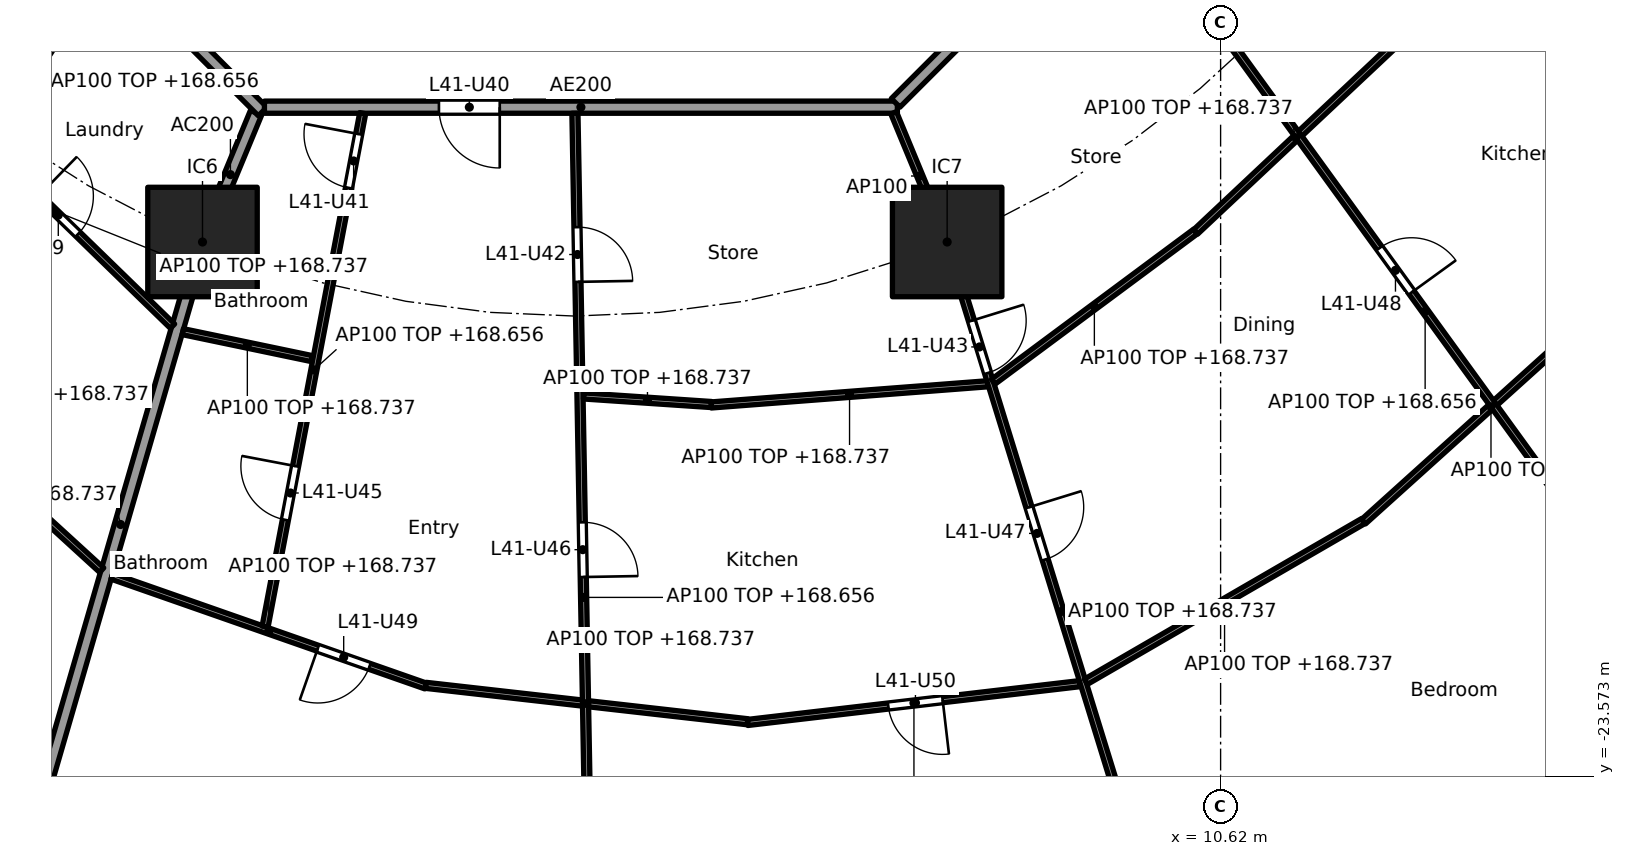
"""IFC4 building model, lengths in metres.
Left out: names, types, materials, properties, quantities, classifications, styles, units other than length and angle.
Written with IfcOpenShell. Run it as: python <this file> out.ifc"""

import sys

from ifc_helpers import new_model, si_unit, direction, frame, frame_2d, origin, origin_2d, place, context, subcontext, project, spatial, rectangle, extrude, element, fill, save


model = new_model("IFC4")
c1 = context("Model", 3, precision=1e-05, world=origin(), true_north=direction((0.0, 1.0)))
c2 = subcontext(c1, "Body", "Model", "MODEL_VIEW")
j1 = project(units=[si_unit("LENGTHUNIT", "METRE"), si_unit("PLANEANGLEUNIT", "RADIAN")], contexts=[c1])
p1 = place(None, origin())
s1 = spatial("IfcSite", under=j1, at=p1, CompositionType="ELEMENT")
p2 = place(p1, origin())
s2 = spatial("IfcBuilding", under=s1, at=p2, CompositionType="ELEMENT")
p3 = place(p2, frame((0.0, 0.0, 165.9)))
s3 = spatial("IfcBuildingStorey", under=s2, at=p3, CompositionType="ELEMENT", Elevation=165.9)
for number, where, z_axis, x_axis in (
    (1, (-6.123, -14.782, 0.0), (0.0, 0.0, 1.0), (1.0, 0.0, 0.0)),
    (2, (6.123, -14.782, 0.0), (0.0, 0.0, 1.0), (1.0, 0.0, 0.0)),
):
    element("IfcColumn", number, at=place(p3, frame(where, z_axis=z_axis, x_axis=x_axis)), inside=s3, PredefinedType="COLUMN", context=c2, shape_type="SweptSolid", body=[
        extrude(rectangle(XDim=1.8, YDim=1.8, at=origin_2d()), origin(), (0.0, 0.0, 1.0), 3.7),
    ])
p4 = place(p3, frame((-12.553, -23.989, 0.0), z_axis=(0.0, 0.0, 1.0), x_axis=(0.835812595664, -0.549014849462, 0.0)))
e3 = element("IfcWall", 3, at=p4, inside=s3, PredefinedType="SOLIDWALL", context=c2, shape_type="SweptSolid", body=[
    extrude(rectangle(XDim=6.903, YDim=1.6, at=frame_2d((3.451, 0.0))), origin(), (0.0, 0.0, 1.0), 1.1),
])
p5 = place(p3, frame((-5.243, -12.657, 0.0), z_axis=(0.0, 0.0, 1.0), x_axis=(-0.382707856524, -0.923869415315, 0.0)))
e4 = element("IfcWall", 4, at=p5, inside=s3, PredefinedType="PARTITIONING", context=c2, shape_type="SweptSolid", body=[
    extrude(rectangle(XDim=2.2, YDim=0.2, at=frame_2d((1.1, 0.0))), origin(), (0.0, 0.0, 1.0), 3.44),
])
p6 = place(p3, frame((-6.137, -14.83, 0.0), z_axis=(0.0, 0.0, 1.0), x_axis=(-0.278461169897, -0.96044748782, 0.0)))
e5 = element("IfcWall", 5, at=p6, inside=s3, PredefinedType="PARTITIONING", context=c2, shape_type="SweptSolid", body=[
    extrude(rectangle(XDim=9.573, YDim=0.2, at=frame_2d((4.787, 0.0))), origin(), (0.0, 0.0, 1.0), 2.837),
])
p7 = place(p3, frame((14.822, -6.154, 0.0), z_axis=(0.0, 0.0, 1.0), x_axis=(0.792203056092, -0.610257583254, 0.0)))
e6 = element("IfcWall", 6, at=p7, inside=s3, PredefinedType="PARTITIONING", context=c2, shape_type="SweptSolid", body=[
    extrude(rectangle(XDim=12.533, YDim=0.2, at=frame_2d((6.266, 0.0))), origin(), (0.0, 0.0, 1.0), 2.837),
])
p8 = place(p3, frame((-12.635, -5.134, 0.0), z_axis=(0.0, 0.0, 1.0), x_axis=(0.707106781187, -0.707106781187, 0.0)))
e7 = element("IfcWall", 7, at=p8, inside=s3, PredefinedType="PARTITIONING", context=c2, shape_type="SweptSolid", body=[
    extrude(rectangle(XDim=10.609, YDim=0.2, at=frame_2d((5.305, 0.0))), origin(), (0.0, 0.0, 1.0), 3.44),
])
p9 = place(p3, frame((-5.104, -12.565, 0.0), z_axis=(0.0, 0.0, 1.0), x_axis=(1.0, 0.0, 0.0)))
e8 = element("IfcWall", 8, at=p9, inside=s3, PredefinedType="PARTITIONING", context=c2, shape_type="SweptSolid", body=[
    extrude(rectangle(XDim=10.409, YDim=0.2, at=frame_2d((5.205, 0.0))), origin(), (0.0, 0.0, 1.0), 3.44),
])
p10 = place(p9, frame((2.87, 0.0, 0.0)))
e9 = element("IfcOpeningElement", 9, at=p10, cuts=e8, PredefinedType="OPENING", context=c2, shape_type="SweptSolid", body=[
    extrude(rectangle(XDim=1.0, YDim=2.1, at=frame_2d((0.5, 1.05))), frame((0.0, 0.11, 0.0), z_axis=(0.0, -1.0, 0.0), x_axis=(1.0, 0.0, 0.0)), (0.0, 0.0, 1.0), 0.22),
])
p11 = place(p3, frame((5.275, -12.494, 0.0), z_axis=(0.0, 0.0, 1.0), x_axis=(0.707106781187, 0.707106781187, 0.0)))
e10 = element("IfcWall", 10, at=p11, inside=s3, PredefinedType="PARTITIONING", context=c2, shape_type="SweptSolid", body=[
    extrude(rectangle(XDim=10.409, YDim=0.2, at=frame_2d((5.205, 0.0))), origin(), (0.0, 0.0, 1.0), 3.44),
])
p12 = place(p3, frame((-7.712, -10.195, 0.0), z_axis=(0.0, 0.0, 1.0), x_axis=(-0.544170086001, -0.838974920663, 0.0)))
e11 = element("IfcWall", 11, at=p12, inside=s3, PredefinedType="PARTITIONING", context=c2, shape_type="SweptSolid", body=[
    extrude(rectangle(XDim=3.535, YDim=0.1, at=frame_2d((1.768, 0.0))), origin(), (0.0, 0.0, 1.0), 2.756),
])
p13 = place(p3, frame((-9.627, -13.238, 0.0), z_axis=(0.0, 0.0, 1.0), x_axis=(0.716919058692, -0.697156412352, 0.0)))
e12 = element("IfcWall", 12, at=p13, inside=s3, PredefinedType="PARTITIONING", context=c2, shape_type="SweptSolid", body=[
    extrude(rectangle(XDim=4.2, YDim=0.1, at=frame_2d((2.1, 0.0))), origin(), (0.0, 0.0, 1.0), 2.837),
])
p14 = place(p13, frame((1.13, 0.0, 0.0)))
e13 = element("IfcOpeningElement", 13, at=p14, cuts=e12, PredefinedType="OPENING", context=c2, shape_type="SweptSolid", body=[
    extrude(rectangle(XDim=0.9, YDim=2.1, at=frame_2d((0.45, 1.05))), frame((0.0, 0.06, 0.0), z_axis=(0.0, -1.0, 0.0), x_axis=(1.0, 0.0, 0.0)), (0.0, 0.0, 1.0), 0.12),
])
p15 = place(p3, frame((-11.766, -16.535, 0.0), z_axis=(0.0, 0.0, 1.0), x_axis=(0.73807320557, -0.674720640872, 0.0)))
e14 = element("IfcWall", 14, at=p15, inside=s3, PredefinedType="PARTITIONING", context=c2, shape_type="SweptSolid", body=[
    extrude(rectangle(XDim=5.399, YDim=0.1, at=frame_2d((2.699, 0.0))), origin(), (0.0, 0.0, 1.0), 2.837),
])
p16 = place(p3, frame((-6.447, -16.256, 0.0), z_axis=(0.0, 0.0, 1.0), x_axis=(0.978909151576, -0.204296042448, 0.0)))
e15 = element("IfcWall", 15, at=p16, inside=s3, PredefinedType="PARTITIONING", context=c2, shape_type="SweptSolid", body=[
    extrude(rectangle(XDim=2.168, YDim=0.1, at=frame_2d((1.084, 0.0))), origin(), (0.0, 0.0, 1.0), 2.837),
])
p17 = place(p3, frame((-7.613, -20.278, 0.0), z_axis=(0.0, 0.0, 1.0), x_axis=(0.943918212431, -0.330179357684, 0.0)))
e16 = element("IfcWall", 16, at=p17, inside=s3, PredefinedType="PARTITIONING", context=c2, shape_type="SweptSolid", body=[
    extrude(rectangle(XDim=5.467, YDim=0.1, at=frame_2d((2.734, 0.0))), origin(), (0.0, 0.0, 1.0), 2.837),
])
p18 = place(p17, frame((3.588, 0.0, 0.0)))
e17 = element("IfcOpeningElement", 17, at=p18, cuts=e16, PredefinedType="OPENING", context=c2, shape_type="SweptSolid", body=[
    extrude(rectangle(XDim=0.9, YDim=2.1, at=frame_2d((0.45, 1.05))), frame((0.0, 0.06, 0.0), z_axis=(0.0, -1.0, 0.0), x_axis=(1.0, 0.0, 0.0)), (0.0, 0.0, 1.0), 0.12),
])
p19 = place(p3, frame((-3.488, -12.663, 0.0), z_axis=(0.0, 0.0, 1.0), x_axis=(-0.186783185485, -0.982401161247, 0.0)))
e18 = element("IfcWall", 18, at=p19, inside=s3, PredefinedType="PARTITIONING", context=c2, shape_type="SweptSolid", body=[
    extrude(rectangle(XDim=8.595, YDim=0.1, at=frame_2d((4.298, 0.0))), origin(), (0.0, 0.0, 1.0), 2.756),
])
p20 = place(p19, frame((0.35, 0.0, 0.0)))
e19 = element("IfcOpeningElement", 19, at=p20, cuts=e18, PredefinedType="OPENING", context=c2, shape_type="SweptSolid", body=[
    extrude(rectangle(XDim=0.9, YDim=2.1, at=frame_2d((0.45, 1.05))), frame((0.0, 0.06, 0.0), z_axis=(0.0, -1.0, 0.0), x_axis=(1.0, 0.0, 0.0)), (0.0, 0.0, 1.0), 0.12),
])
p21 = place(p19, frame((5.908, 0.0, 0.0)))
e20 = element("IfcOpeningElement", 20, at=p21, cuts=e18, PredefinedType="OPENING", context=c2, shape_type="SweptSolid", body=[
    extrude(rectangle(XDim=0.9, YDim=2.1, at=frame_2d((0.45, 1.05))), frame((0.0, 0.06, 0.0), z_axis=(0.0, -1.0, 0.0), x_axis=(1.0, 0.0, 0.0)), (0.0, 0.0, 1.0), 0.12),
])
p22 = place(p3, frame((-2.449, -22.073, 0.0), z_axis=(0.0, 0.0, 1.0), x_axis=(0.993660315081, -0.112424099879, 0.0)))
e21 = element("IfcWall", 21, at=p22, inside=s3, PredefinedType="PARTITIONING", context=c2, shape_type="SweptSolid", body=[
    extrude(rectangle(XDim=5.325, YDim=0.1, at=frame_2d((2.662, 0.0))), origin(), (0.0, 0.0, 1.0), 2.837),
])
p23 = place(p3, frame((0.002, -12.665, 0.0), z_axis=(0.0, 0.0, 1.0), x_axis=(0.01792079652, -0.999839409631, 0.0)))
e22 = element("IfcWall", 22, at=p23, inside=s3, PredefinedType="PARTITIONING", context=c2, shape_type="SweptSolid", body=[
    extrude(rectangle(XDim=15.926, YDim=0.1, at=frame_2d((7.963, 0.0))), origin(), (0.0, 0.0, 1.0), 2.756),
])
p24 = place(p23, frame((1.873, 0.0, 0.0)))
e23 = element("IfcOpeningElement", 23, at=p24, cuts=e22, PredefinedType="OPENING", context=c2, shape_type="SweptSolid", body=[
    extrude(rectangle(XDim=0.9, YDim=2.1, at=frame_2d((0.45, 1.05))), frame((0.0, 0.06, 0.0), z_axis=(0.0, -1.0, 0.0), x_axis=(1.0, 0.0, 0.0)), (0.0, 0.0, 1.0), 0.12),
])
p25 = place(p23, frame((6.728, 0.0, 0.0)))
e24 = element("IfcOpeningElement", 24, at=p25, cuts=e22, PredefinedType="OPENING", context=c2, shape_type="SweptSolid", body=[
    extrude(rectangle(XDim=0.9, YDim=2.1, at=frame_2d((0.45, 1.05))), frame((0.0, 0.06, 0.0), z_axis=(0.0, -1.0, 0.0), x_axis=(1.0, 0.0, 0.0)), (0.0, 0.0, 1.0), 0.12),
])
p26 = place(p3, frame((0.145, -17.314, 0.0), z_axis=(0.0, 0.0, 1.0), x_axis=(0.997756833447, -0.06694252243, 0.0)))
e25 = element("IfcWall", 25, at=p26, inside=s3, PredefinedType="PARTITIONING", context=c2, shape_type="SweptSolid", body=[
    extrude(rectangle(XDim=2.104, YDim=0.1, at=frame_2d((1.052, 0.0))), origin(), (0.0, 0.0, 1.0), 2.837),
])
p27 = place(p3, frame((2.245, -17.462, 0.0), z_axis=(0.0, 0.0, 1.0), x_axis=(0.997077117727, 0.07640171009, 0.0)))
e26 = element("IfcWall", 26, at=p27, inside=s3, PredefinedType="PARTITIONING", context=c2, shape_type="SweptSolid", body=[
    extrude(rectangle(XDim=4.56, YDim=0.1, at=frame_2d((2.28, 0.0))), origin(), (0.0, 0.0, 1.0), 2.837),
])
p28 = place(p3, frame((2.842, -22.683, 0.0), z_axis=(0.0, 0.0, 1.0), x_axis=(0.993248590259, 0.116005335864, 0.0)))
e27 = element("IfcWall", 27, at=p28, inside=s3, PredefinedType="PARTITIONING", context=c2, shape_type="SweptSolid", body=[
    extrude(rectangle(XDim=5.508, YDim=0.1, at=frame_2d((2.754, 0.0))), origin(), (0.0, 0.0, 1.0), 2.837),
])
p29 = place(p28, frame((2.329, 0.0, 0.0)))
e28 = element("IfcOpeningElement", 28, at=p29, cuts=e27, PredefinedType="OPENING", context=c2, shape_type="SweptSolid", body=[
    extrude(rectangle(XDim=0.9, YDim=2.1, at=frame_2d((0.45, 1.05))), frame((0.0, 0.06, 0.0), z_axis=(0.0, -1.0, 0.0), x_axis=(1.0, 0.0, 0.0)), (0.0, 0.0, 1.0), 0.12),
])
p30 = place(p3, frame((5.243, -12.657, 0.0), z_axis=(0.0, 0.0, 1.0), x_axis=(0.382719158442, -0.923864733477, 0.0)))
e29 = element("IfcWall", 29, at=p30, inside=s3, PredefinedType="PARTITIONING", context=c2, shape_type="SweptSolid", body=[
    extrude(rectangle(XDim=2.25, YDim=0.1, at=frame_2d((1.125, 0.0))), origin(), (0.0, 0.0, 1.0), 3.44),
])
p31 = place(p3, frame((6.138, -14.83, 0.0), z_axis=(0.0, 0.0, 1.0), x_axis=(0.294818517221, -0.955553264818, 0.0)))
e30 = element("IfcWall", 30, at=p31, inside=s3, PredefinedType="PARTITIONING", context=c2, shape_type="SweptSolid", body=[
    extrude(rectangle(XDim=12.619, YDim=0.1, at=frame_2d((6.31, 0.0))), origin(), (0.0, 0.0, 1.0), 2.837),
])
p32 = place(p31, frame((1.306, 0.0, 0.0)))
e31 = element("IfcOpeningElement", 31, at=p32, cuts=e30, PredefinedType="OPENING", context=c2, shape_type="SweptSolid", body=[
    extrude(rectangle(XDim=0.9, YDim=2.1, at=frame_2d((0.45, 1.05))), frame((0.0, 0.06, 0.0), z_axis=(0.0, -1.0, 0.0), x_axis=(1.0, 0.0, 0.0)), (0.0, 0.0, 1.0), 0.12),
])
p33 = place(p31, frame((4.515, 0.0, 0.0)))
e32 = element("IfcOpeningElement", 32, at=p33, cuts=e30, PredefinedType="OPENING", context=c2, shape_type="SweptSolid", body=[
    extrude(rectangle(XDim=0.9, YDim=2.1, at=frame_2d((0.45, 1.05))), frame((0.0, 0.06, 0.0), z_axis=(0.0, -1.0, 0.0), x_axis=(1.0, 0.0, 0.0)), (0.0, 0.0, 1.0), 0.12),
])
p34 = place(p31, frame((9.632, 0.0, 0.0)))
e33 = element("IfcOpeningElement", 33, at=p34, cuts=e30, PredefinedType="OPENING", context=c2, shape_type="SweptSolid", body=[
    extrude(rectangle(XDim=0.9, YDim=2.1, at=frame_2d((0.45, 1.05))), frame((0.0, 0.06, 0.0), z_axis=(0.0, -1.0, 0.0), x_axis=(1.0, 0.0, 0.0)), (0.0, 0.0, 1.0), 0.12),
])
p35 = place(p3, frame((6.881, -17.08, 0.0), z_axis=(0.0, 0.0, 1.0), x_axis=(0.802784956441, 0.596268659005, 0.0)))
e34 = element("IfcWall", 34, at=p35, inside=s3, PredefinedType="PARTITIONING", context=c2, shape_type="SweptSolid", body=[
    extrude(rectangle(XDim=4.142, YDim=0.1, at=frame_2d((2.071, 0.0))), origin(), (0.0, 0.0, 1.0), 2.837),
])
p36 = place(p3, frame((8.405, -22.013, 0.0), z_axis=(0.0, 0.0, 1.0), x_axis=(0.865277177388, 0.501293732547, 0.0)))
e35 = element("IfcWall", 35, at=p36, inside=s3, PredefinedType="PARTITIONING", context=c2, shape_type="SweptSolid", body=[
    extrude(rectangle(XDim=5.27, YDim=0.1, at=frame_2d((2.635, 0.0))), origin(), (0.0, 0.0, 1.0), 2.837),
])
p37 = place(p3, frame((10.21, -14.614, 0.0), z_axis=(0.0, 0.0, 1.0), x_axis=(0.728883199496, 0.684638066055, 0.0)))
e36 = element("IfcWall", 36, at=p37, inside=s3, PredefinedType="PARTITIONING", context=c2, shape_type="SweptSolid", body=[
    extrude(rectangle(XDim=4.519, YDim=0.1, at=frame_2d((2.26, 0.0))), origin(), (0.0, 0.0, 1.0), 2.837),
])
p38 = place(p3, frame((12.971, -19.38, 0.0), z_axis=(0.0, 0.0, 1.0), x_axis=(0.742768881471, 0.669547898748, 0.0)))
e37 = element("IfcWall", 37, at=p38, inside=s3, PredefinedType="PARTITIONING", context=c2, shape_type="SweptSolid", body=[
    extrude(rectangle(XDim=5.642, YDim=0.1, at=frame_2d((2.821, 0.0))), origin(), (0.0, 0.0, 1.0), 2.837),
])
p39 = place(p3, frame((8.943, -8.966, 0.0), z_axis=(0.0, 0.0, 1.0), x_axis=(0.586803608919, -0.809729290912, 0.0)))
e38 = element("IfcWall", 38, at=p39, inside=s3, PredefinedType="PARTITIONING", context=c2, shape_type="SweptSolid", body=[
    extrude(rectangle(XDim=17.179, YDim=0.1, at=frame_2d((8.589, 0.0))), origin(), (0.0, 0.0, 1.0), 2.756),
])
p40 = place(p39, frame((2.062, 0.0, 0.0)))
e39 = element("IfcOpeningElement", 39, at=p40, cuts=e38, PredefinedType="OPENING", context=c2, shape_type="SweptSolid", body=[
    extrude(rectangle(XDim=0.9, YDim=2.1, at=frame_2d((0.45, 1.05))), frame((0.0, 0.06, 0.0), z_axis=(0.0, -1.0, 0.0), x_axis=(1.0, 0.0, 0.0)), (0.0, 0.0, 1.0), 0.12),
])
p41 = place(p39, frame((7.308, 0.0, 0.0)))
e40 = element("IfcOpeningElement", 40, at=p41, cuts=e38, PredefinedType="OPENING", context=c2, shape_type="SweptSolid", body=[
    extrude(rectangle(XDim=0.9, YDim=2.1, at=frame_2d((0.45, 1.05))), frame((0.0, 0.06, 0.0), z_axis=(0.0, -1.0, 0.0), x_axis=(1.0, 0.0, 0.0)), (0.0, 0.0, 1.0), 0.12),
])
p42 = place(p14, origin())
e41 = element("IfcDoor", 41, at=p42, inside=s3, OperationType="SINGLE_SWING_LEFT", PredefinedType="DOOR", context=c2, shape_type="SweptSolid", body=[
    extrude(rectangle(XDim=0.9, YDim=2.1, at=frame_2d((0.45, 1.05))), frame((0.0, 0.025, 0.0), z_axis=(0.0, -1.0, 0.0), x_axis=(1.0, 0.0, 0.0)), (0.0, 0.0, 1.0), 0.05),
])
fill(e13, e41)
p43 = place(p10, frame((1.0, 0.0, 0.0), x_axis=(-1.0, 0.0, 0.0)))
e42 = element("IfcDoor", 42, at=p43, inside=s3, OperationType="SINGLE_SWING_LEFT", PredefinedType="DOOR", context=c2, shape_type="SweptSolid", body=[
    extrude(rectangle(XDim=1.0, YDim=2.1, at=frame_2d((0.5, 1.05))), frame((0.0, 0.025, 0.0), z_axis=(0.0, -1.0, 0.0), x_axis=(1.0, 0.0, 0.0)), (0.0, 0.0, 1.0), 0.05),
])
fill(e9, e42)
p44 = place(p20, frame((0.9, 0.0, 0.0), x_axis=(-1.0, 0.0, 0.0)))
e43 = element("IfcDoor", 43, at=p44, inside=s3, OperationType="SINGLE_SWING_RIGHT", PredefinedType="DOOR", context=c2, shape_type="SweptSolid", body=[
    extrude(rectangle(XDim=0.9, YDim=2.1, at=frame_2d((0.45, 1.05))), frame((0.0, 0.025, 0.0), z_axis=(0.0, -1.0, 0.0), x_axis=(1.0, 0.0, 0.0)), (0.0, 0.0, 1.0), 0.05),
])
fill(e19, e43)
p45 = place(p24, origin())
e44 = element("IfcDoor", 44, at=p45, inside=s3, OperationType="SINGLE_SWING_RIGHT", PredefinedType="DOOR", context=c2, shape_type="SweptSolid", body=[
    extrude(rectangle(XDim=0.9, YDim=2.1, at=frame_2d((0.45, 1.05))), frame((0.0, 0.025, 0.0), z_axis=(0.0, -1.0, 0.0), x_axis=(1.0, 0.0, 0.0)), (0.0, 0.0, 1.0), 0.05),
])
fill(e23, e44)
p46 = place(p32, origin())
e45 = element("IfcDoor", 45, at=p46, inside=s3, OperationType="SINGLE_SWING_LEFT", PredefinedType="DOOR", context=c2, shape_type="SweptSolid", body=[
    extrude(rectangle(XDim=0.9, YDim=2.1, at=frame_2d((0.45, 1.05))), frame((0.0, 0.025, 0.0), z_axis=(0.0, -1.0, 0.0), x_axis=(1.0, 0.0, 0.0)), (0.0, 0.0, 1.0), 0.05),
])
fill(e31, e45)
p47 = place(p21, frame((0.9, 0.0, 0.0), x_axis=(-1.0, 0.0, 0.0)))
e46 = element("IfcDoor", 46, at=p47, inside=s3, OperationType="SINGLE_SWING_RIGHT", PredefinedType="DOOR", context=c2, shape_type="SweptSolid", body=[
    extrude(rectangle(XDim=0.9, YDim=2.1, at=frame_2d((0.45, 1.05))), frame((0.0, 0.025, 0.0), z_axis=(0.0, -1.0, 0.0), x_axis=(1.0, 0.0, 0.0)), (0.0, 0.0, 1.0), 0.05),
])
fill(e20, e46)
p48 = place(p25, origin())
e47 = element("IfcDoor", 47, at=p48, inside=s3, OperationType="SINGLE_SWING_RIGHT", PredefinedType="DOOR", context=c2, shape_type="SweptSolid", body=[
    extrude(rectangle(XDim=0.9, YDim=2.1, at=frame_2d((0.45, 1.05))), frame((0.0, 0.025, 0.0), z_axis=(0.0, -1.0, 0.0), x_axis=(1.0, 0.0, 0.0)), (0.0, 0.0, 1.0), 0.05),
])
fill(e24, e47)
p49 = place(p33, origin())
e48 = element("IfcDoor", 48, at=p49, inside=s3, OperationType="SINGLE_SWING_LEFT", PredefinedType="DOOR", context=c2, shape_type="SweptSolid", body=[
    extrude(rectangle(XDim=0.9, YDim=2.1, at=frame_2d((0.45, 1.05))), frame((0.0, 0.025, 0.0), z_axis=(0.0, -1.0, 0.0), x_axis=(1.0, 0.0, 0.0)), (0.0, 0.0, 1.0), 0.05),
])
fill(e32, e48)
p50 = place(p41, origin())
e49 = element("IfcDoor", 49, at=p50, inside=s3, OperationType="SINGLE_SWING_RIGHT", PredefinedType="DOOR", context=c2, shape_type="SweptSolid", body=[
    extrude(rectangle(XDim=0.9, YDim=2.1, at=frame_2d((0.45, 1.05))), frame((0.0, 0.025, 0.0), z_axis=(0.0, -1.0, 0.0), x_axis=(1.0, 0.0, 0.0)), (0.0, 0.0, 1.0), 0.05),
])
fill(e40, e49)
p51 = place(p18, frame((0.9, 0.0, 0.0), x_axis=(-1.0, 0.0, 0.0)))
e50 = element("IfcDoor", 50, at=p51, inside=s3, OperationType="SINGLE_SWING_RIGHT", PredefinedType="DOOR", context=c2, shape_type="SweptSolid", body=[
    extrude(rectangle(XDim=0.9, YDim=2.1, at=frame_2d((0.45, 1.05))), frame((0.0, 0.025, 0.0), z_axis=(0.0, -1.0, 0.0), x_axis=(1.0, 0.0, 0.0)), (0.0, 0.0, 1.0), 0.05),
])
fill(e17, e50)
p52 = place(p29, frame((0.9, 0.0, 0.0), x_axis=(-1.0, 0.0, 0.0)))
e51 = element("IfcDoor", 51, at=p52, inside=s3, OperationType="SINGLE_SWING_LEFT", PredefinedType="DOOR", context=c2, shape_type="SweptSolid", body=[
    extrude(rectangle(XDim=0.9, YDim=2.1, at=frame_2d((0.45, 1.05))), frame((0.0, 0.025, 0.0), z_axis=(0.0, -1.0, 0.0), x_axis=(1.0, 0.0, 0.0)), (0.0, 0.0, 1.0), 0.05),
])
fill(e28, e51)
save(model, sys.argv[1])
